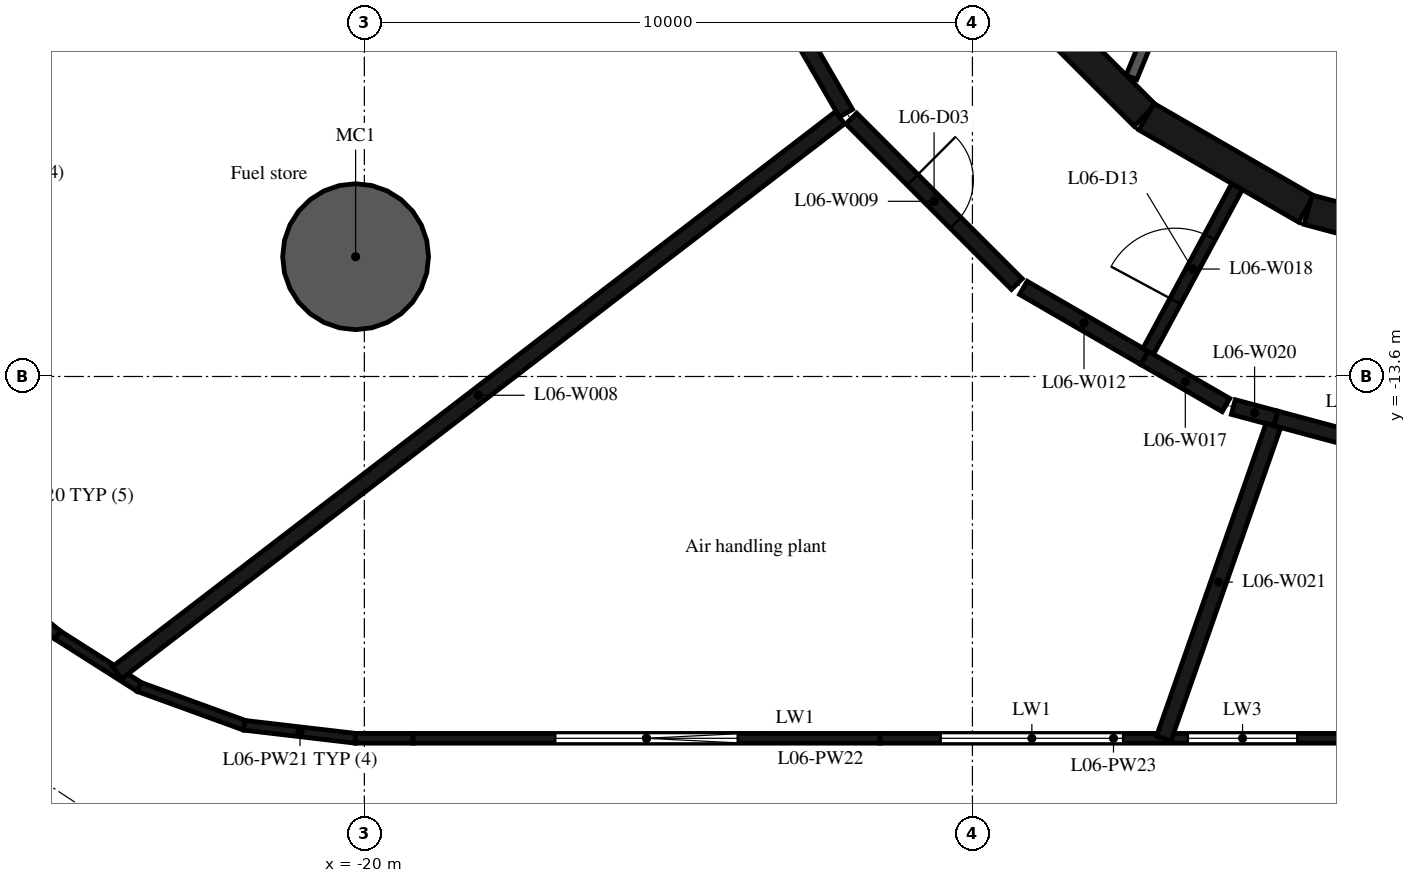
"""IFC4 building model, lengths in metres.
Left out: names, types, materials, properties, quantities, classifications, styles, units other than length and angle.
Written with IfcOpenShell. Run it as: python <this file> out.ifc"""

import sys

from ifc_helpers import new_model, si_unit, direction, frame, frame_2d, origin, origin_2d, place, context, subcontext, project, spatial, rectangle, hollow_circle, extrude, element, fill, save


model = new_model("IFC4")
c1 = context("Model", 3, precision=1e-05, world=origin(), true_north=direction((0.0, 1.0)))
c2 = subcontext(c1, "Body", "Model", "MODEL_VIEW")
j1 = project(units=[si_unit("LENGTHUNIT", "METRE"), si_unit("PLANEANGLEUNIT", "RADIAN")], contexts=[c1])
p1 = place(None, origin())
s1 = spatial("IfcSite", under=j1, at=p1, CompositionType="ELEMENT")
p2 = place(p1, origin())
s2 = spatial("IfcBuilding", under=s1, at=p2, CompositionType="ELEMENT")
p3 = place(p2, frame((0.0, 0.0, 33.0)))
s3 = spatial("IfcBuildingStorey", under=s2, at=p3, CompositionType="ELEMENT", Elevation=33.0)
p4 = place(p3, frame((-20.144, -11.63, -0.45), z_axis=(0.0, 0.0, 1.0), x_axis=(1.0, 0.0, 0.0)))
e1 = element("IfcColumn", 1, at=p4, inside=s3, PredefinedType="COLUMN", context=c2, shape_type="SweptSolid", body=[
    extrude(hollow_circle(Radius=1.2, WallThickness=0.06, at=origin_2d()), origin(), (0.0, 0.0, 1.0), 5.4),
])
p5 = place(p3, frame((-25.237, -17.695, 0.0), z_axis=(0.0, 0.0, 1.0), x_axis=(0.775874220568, -0.630887623795, 0.0)))
e2 = element("IfcWall", 2, at=p5, inside=s3, PredefinedType="STANDARD", context=c2, shape_type="SweptSolid", body=[
    extrude(rectangle(XDim=0.249, YDim=0.16, at=frame_2d((0.125, 0.0))), origin(), (0.0, 0.0, 1.0), 4.95),
])
p6 = place(p3, frame((-25.043, -17.853, 0.0), z_axis=(0.0, 0.0, 1.0), x_axis=(0.844000986035, -0.536341622076, 0.0)))
e3 = element("IfcWall", 3, at=p6, inside=s3, PredefinedType="STANDARD", context=c2, shape_type="SweptSolid", body=[
    extrude(rectangle(XDim=1.598, YDim=0.16, at=frame_2d((0.799, 0.0))), origin(), (0.0, 0.0, 1.0), 4.95),
])
p7 = place(p3, frame((-23.702, -18.706, 0.0), z_axis=(0.0, 0.0, 1.0), x_axis=(0.939716242701, -0.341955235673, 0.0)))
e4 = element("IfcWall", 4, at=p7, inside=s3, PredefinedType="STANDARD", context=c2, shape_type="SweptSolid", body=[
    extrude(rectangle(XDim=1.848, YDim=0.16, at=frame_2d((0.924, 0.0))), origin(), (0.0, 0.0, 1.0), 4.95),
])
p8 = place(p3, frame((-21.975, -19.336, 0.0), z_axis=(0.0, 0.0, 1.0), x_axis=(0.993233418606, -0.116135163342, 0.0)))
e5 = element("IfcWall", 5, at=p8, inside=s3, PredefinedType="STANDARD", context=c2, shape_type="SweptSolid", body=[
    extrude(rectangle(XDim=1.846, YDim=0.16, at=frame_2d((0.923, 0.0))), origin(), (0.0, 0.0, 1.0), 4.95),
])
p9 = place(p3, frame((-20.146, -19.55, 0.0), z_axis=(0.0, 0.0, 1.0), x_axis=(1.0, 0.0, 0.0)))
e6 = element("IfcWall", 6, at=p9, inside=s3, PredefinedType="STANDARD", context=c2, shape_type="SweptSolid", body=[
    extrude(rectangle(XDim=0.946, YDim=0.16, at=frame_2d((0.473, 0.0))), origin(), (0.0, 0.0, 1.0), 4.95),
])
p10 = place(p3, frame((-19.2, -19.55, 0.0), z_axis=(0.0, 0.0, 1.0), x_axis=(1.0, 0.0, 0.0)))
e7 = element("IfcWall", 7, at=p10, inside=s3, PredefinedType="STANDARD", context=c2, shape_type="SweptSolid", body=[
    extrude(rectangle(XDim=7.68, YDim=0.16, at=frame_2d((3.84, 0.0))), origin(), (0.0, 0.0, 1.0), 4.95),
])
p11 = place(p10, frame((2.34, 0.0, 1.0)))
e8 = element("IfcOpeningElement", 8, at=p11, cuts=e7, PredefinedType="OPENING", context=c2, shape_type="SweptSolid", body=[
    extrude(rectangle(XDim=3.0, YDim=2.2, at=frame_2d((1.5, 1.1))), frame((0.0, 0.09, 0.0), z_axis=(0.0, -1.0, 0.0), x_axis=(1.0, 0.0, 0.0)), (0.0, 0.0, 1.0), 0.18),
])
p12 = place(p3, frame((-11.52, -19.55, 0.0), z_axis=(0.0, 0.0, 1.0), x_axis=(1.0, 0.0, 0.0)))
e9 = element("IfcWall", 9, at=p12, inside=s3, PredefinedType="STANDARD", context=c2, shape_type="SweptSolid", body=[
    extrude(rectangle(XDim=7.68, YDim=0.16, at=frame_2d((3.84, 0.0))), origin(), (0.0, 0.0, 1.0), 4.95),
])
p13 = place(p12, frame((0.998, 0.0, 1.0)))
e10 = element("IfcOpeningElement", 10, at=p13, cuts=e9, PredefinedType="OPENING", context=c2, shape_type="SweptSolid", body=[
    extrude(rectangle(XDim=3.0, YDim=2.2, at=frame_2d((1.5, 1.1))), frame((0.0, 0.09, 0.0), z_axis=(0.0, -1.0, 0.0), x_axis=(1.0, 0.0, 0.0)), (0.0, 0.0, 1.0), 0.18),
])
p14 = place(p12, frame((5.062, 0.0, 1.0)))
e11 = element("IfcOpeningElement", 11, at=p14, cuts=e9, PredefinedType="OPENING", context=c2, shape_type="SweptSolid", body=[
    extrude(rectangle(XDim=1.8, YDim=2.2, at=frame_2d((0.9, 1.1))), frame((0.0, 0.09, 0.0), z_axis=(0.0, -1.0, 0.0), x_axis=(1.0, 0.0, 0.0)), (0.0, 0.0, 1.0), 0.18),
])
p15 = place(p3, frame((-9.308, -7.164, 0.0), z_axis=(0.0, 0.0, 1.0), x_axis=(0.707106781187, -0.707106781187, 0.0)))
e12 = element("IfcWall", 12, at=p15, inside=s3, PredefinedType="SHEAR", context=c2, shape_type="SweptSolid", body=[
    extrude(rectangle(XDim=3.032, YDim=0.5, at=frame_2d((1.516, 0.0))), origin(), (0.0, 0.0, 1.0), 4.95),
])
for number, where, z_axis, x_axis in (
    (13, (-7.137, -9.329, 0.0), (0.0, 0.0, 1.0), (0.866, -0.5, 0.0)),
    (14, (-4.479, -10.858, 0.0), (0.0, 0.0, 1.0), (0.966, -0.259, 0.0)),
):
    element("IfcWall", number, at=place(p3, frame(where, z_axis=z_axis, x_axis=x_axis)), inside=s3, PredefinedType="SHEAR", context=c2, shape_type="SweptSolid", body=[
        extrude(rectangle(XDim=3.033, YDim=0.5, at=frame_2d((1.516, 0.0))), origin(), (0.0, 0.0, 1.0), 4.95),
    ])
p16 = place(p3, frame((-7.385, -8.681, 0.0), z_axis=(0.0, 0.0, 1.0), x_axis=(0.379804590409, 0.925066739811, 0.0)))
e15 = element("IfcWall", 15, at=p16, inside=s3, PredefinedType="PARTITIONING", context=c2, shape_type="SweptSolid", body=[
    extrude(rectangle(XDim=3.885, YDim=0.19, at=frame_2d((1.942, 0.0))), origin(), (0.0, 0.0, 1.0), 4.95),
])
p17 = place(p16, frame((1.443, 0.0, 0.0)))
e16 = element("IfcOpeningElement", 16, at=p17, cuts=e15, PredefinedType="OPENING", context=c2, shape_type="SweptSolid", body=[
    extrude(rectangle(XDim=1.0, YDim=2.4, at=frame_2d((0.5, 1.2))), frame((0.0, 0.105, 0.0), z_axis=(0.0, -1.0, 0.0), x_axis=(1.0, 0.0, 0.0)), (0.0, 0.0, 1.0), 0.21),
])
p18 = place(p3, frame((-14.007, -5.938, 0.0), z_axis=(0.0, 0.0, 1.0), x_axis=(0.500708693508, -0.865615852585, 0.0)))
e17 = element("IfcWall", 17, at=p18, inside=s3, PredefinedType="PARTITIONING", context=c2, shape_type="SweptSolid", body=[
    extrude(rectangle(XDim=3.849, YDim=0.25, at=frame_2d((1.925, 0.0))), origin(), (0.0, 0.0, 1.0), 4.95),
])
p19 = place(p3, frame((-12.179, -9.346, 0.0), z_axis=(0.0, 0.0, 1.0), x_axis=(-0.793242531183, -0.608905811043, 0.0)))
e18 = element("IfcWall", 18, at=p19, inside=s3, PredefinedType="PARTITIONING", context=c2, shape_type="SweptSolid", body=[
    extrude(rectangle(XDim=14.986, YDim=0.25, at=frame_2d((7.493, 0.0))), origin(), (0.0, 0.0, 1.0), 4.95),
])
p20 = place(p3, frame((-11.992, -9.358, 0.0), z_axis=(0.0, 0.0, 1.0), x_axis=(0.707106781187, -0.707106781187, 0.0)))
e19 = element("IfcWall", 19, at=p20, inside=s3, PredefinedType="PARTITIONING", context=c2, shape_type="SweptSolid", body=[
    extrude(rectangle(XDim=3.849, YDim=0.25, at=frame_2d((1.925, 0.0))), origin(), (0.0, 0.0, 1.0), 4.95),
])
p21 = place(p20, frame((1.425, 0.0, 0.0)))
e20 = element("IfcOpeningElement", 20, at=p21, cuts=e19, PredefinedType="OPENING", context=c2, shape_type="SweptSolid", body=[
    extrude(rectangle(XDim=1.0, YDim=2.1, at=frame_2d((0.5, 1.05))), frame((0.0, 0.135, 0.0), z_axis=(0.0, -1.0, 0.0), x_axis=(1.0, 0.0, 0.0)), (0.0, 0.0, 1.0), 0.27),
])
p22 = place(p3, frame((-9.162, -12.143, 0.0), z_axis=(0.0, 0.0, 1.0), x_axis=(0.865576208327, -0.500777223502, 0.0)))
e21 = element("IfcWall", 21, at=p22, inside=s3, PredefinedType="PARTITIONING", context=c2, shape_type="SweptSolid", body=[
    extrude(rectangle(XDim=2.303, YDim=0.25, at=frame_2d((1.152, 0.0))), origin(), (0.0, 0.0, 1.0), 4.95),
])
p23 = place(p3, frame((-7.168, -13.296, 0.0), z_axis=(0.0, 0.0, 1.0), x_axis=(0.865606471313, -0.500724911325, 0.0)))
e22 = element("IfcWall", 22, at=p23, inside=s3, PredefinedType="PARTITIONING", context=c2, shape_type="SweptSolid", body=[
    extrude(rectangle(XDim=1.546, YDim=0.25, at=frame_2d((0.773, 0.0))), origin(), (0.0, 0.0, 1.0), 4.95),
])
p24 = place(p3, frame((-7.109, -13.186, 0.0), z_axis=(0.0, 0.0, 1.0), x_axis=(0.474511788195, 0.880249148176, 0.0)))
e23 = element("IfcWall", 23, at=p24, inside=s3, PredefinedType="PARTITIONING", context=c2, shape_type="SweptSolid", body=[
    extrude(rectangle(XDim=3.074, YDim=0.2, at=frame_2d((1.537, 0.0))), origin(), (0.0, 0.0, 1.0), 4.95),
])
p25 = place(p24, frame((0.937, 0.0, 0.0)))
e24 = element("IfcOpeningElement", 24, at=p25, cuts=e23, PredefinedType="OPENING", context=c2, shape_type="SweptSolid", body=[
    extrude(rectangle(XDim=1.2, YDim=2.1, at=frame_2d((0.6, 1.05))), frame((0.0, 0.11, 0.0), z_axis=(0.0, -1.0, 0.0), x_axis=(1.0, 0.0, 0.0)), (0.0, 0.0, 1.0), 0.22),
])
p26 = place(p3, frame((-5.709, -14.102, 0.0), z_axis=(0.0, 0.0, 1.0), x_axis=(0.965791356005, -0.25932037457, 0.0)))
e25 = element("IfcWall", 25, at=p26, inside=s3, PredefinedType="PARTITIONING", context=c2, shape_type="SweptSolid", body=[
    extrude(rectangle(XDim=0.724, YDim=0.25, at=frame_2d((0.362, 0.0))), origin(), (0.0, 0.0, 1.0), 4.95),
])
p27 = place(p3, frame((-5.051, -14.408, 0.0), z_axis=(0.0, 0.0, 1.0), x_axis=(-0.330509965362, -0.943802502008, 0.0)))
e26 = element("IfcWall", 26, at=p27, inside=s3, PredefinedType="PARTITIONING", context=c2, shape_type="SweptSolid", body=[
    extrude(rectangle(XDim=5.453, YDim=0.25, at=frame_2d((2.727, 0.0))), origin(), (0.0, 0.0, 1.0), 4.95),
])
p28 = place(p3, frame((-5.01, -14.29, 0.0), z_axis=(0.0, 0.0, 1.0), x_axis=(0.965858087727, -0.259071716659, 0.0)))
e27 = element("IfcWall", 27, at=p28, inside=s3, PredefinedType="PARTITIONING", context=c2, shape_type="SweptSolid", body=[
    extrude(rectangle(XDim=3.127, YDim=0.25, at=frame_2d((1.563, 0.0))), origin(), (0.0, 0.0, 1.0), 4.95),
])
p29 = place(p11, origin())
e28 = element("IfcWindow", 28, at=p29, inside=s3, PartitioningType="SINGLE_PANEL", PredefinedType="WINDOW", context=c2, shape_type="SweptSolid", body=[
    extrude(rectangle(XDim=3.0, YDim=2.2, at=frame_2d((1.5, 1.1))), frame((0.0, 0.03, 0.0), z_axis=(0.0, -1.0, 0.0), x_axis=(1.0, 0.0, 0.0)), (0.0, 0.0, 1.0), 0.06),
])
fill(e8, e28)
p30 = place(p13, origin())
e29 = element("IfcWindow", 29, at=p30, inside=s3, PartitioningType="SINGLE_PANEL", PredefinedType="WINDOW", context=c2, shape_type="SweptSolid", body=[
    extrude(rectangle(XDim=3.0, YDim=2.2, at=frame_2d((1.5, 1.1))), frame((0.0, 0.03, 0.0), z_axis=(0.0, -1.0, 0.0), x_axis=(1.0, 0.0, 0.0)), (0.0, 0.0, 1.0), 0.06),
])
fill(e10, e29)
p31 = place(p14, origin())
e30 = element("IfcWindow", 30, at=p31, inside=s3, PartitioningType="SINGLE_PANEL", PredefinedType="WINDOW", context=c2, shape_type="SweptSolid", body=[
    extrude(rectangle(XDim=1.8, YDim=2.2, at=frame_2d((0.9, 1.1))), frame((0.0, 0.03, 0.0), z_axis=(0.0, -1.0, 0.0), x_axis=(1.0, 0.0, 0.0)), (0.0, 0.0, 1.0), 0.06),
])
fill(e11, e30)
p32 = place(p21, origin())
e31 = element("IfcDoor", 31, at=p32, inside=s3, OperationType="SINGLE_SWING_LEFT", PredefinedType="DOOR", context=c2, shape_type="SweptSolid", body=[
    extrude(rectangle(XDim=1.0, YDim=2.1, at=frame_2d((0.5, 1.05))), frame((0.0, 0.025, 0.0), z_axis=(0.0, -1.0, 0.0), x_axis=(1.0, 0.0, 0.0)), (0.0, 0.0, 1.0), 0.05),
])
fill(e20, e31)
p33 = place(p25, origin())
e32 = element("IfcDoor", 32, at=p33, inside=s3, OperationType="SINGLE_SWING_LEFT", PredefinedType="DOOR", context=c2, shape_type="SweptSolid", body=[
    extrude(rectangle(XDim=1.2, YDim=2.1, at=frame_2d((0.6, 1.05))), frame((0.0, 0.025, 0.0), z_axis=(0.0, -1.0, 0.0), x_axis=(1.0, 0.0, 0.0)), (0.0, 0.0, 1.0), 0.05),
])
fill(e24, e32)
save(model, sys.argv[1])
